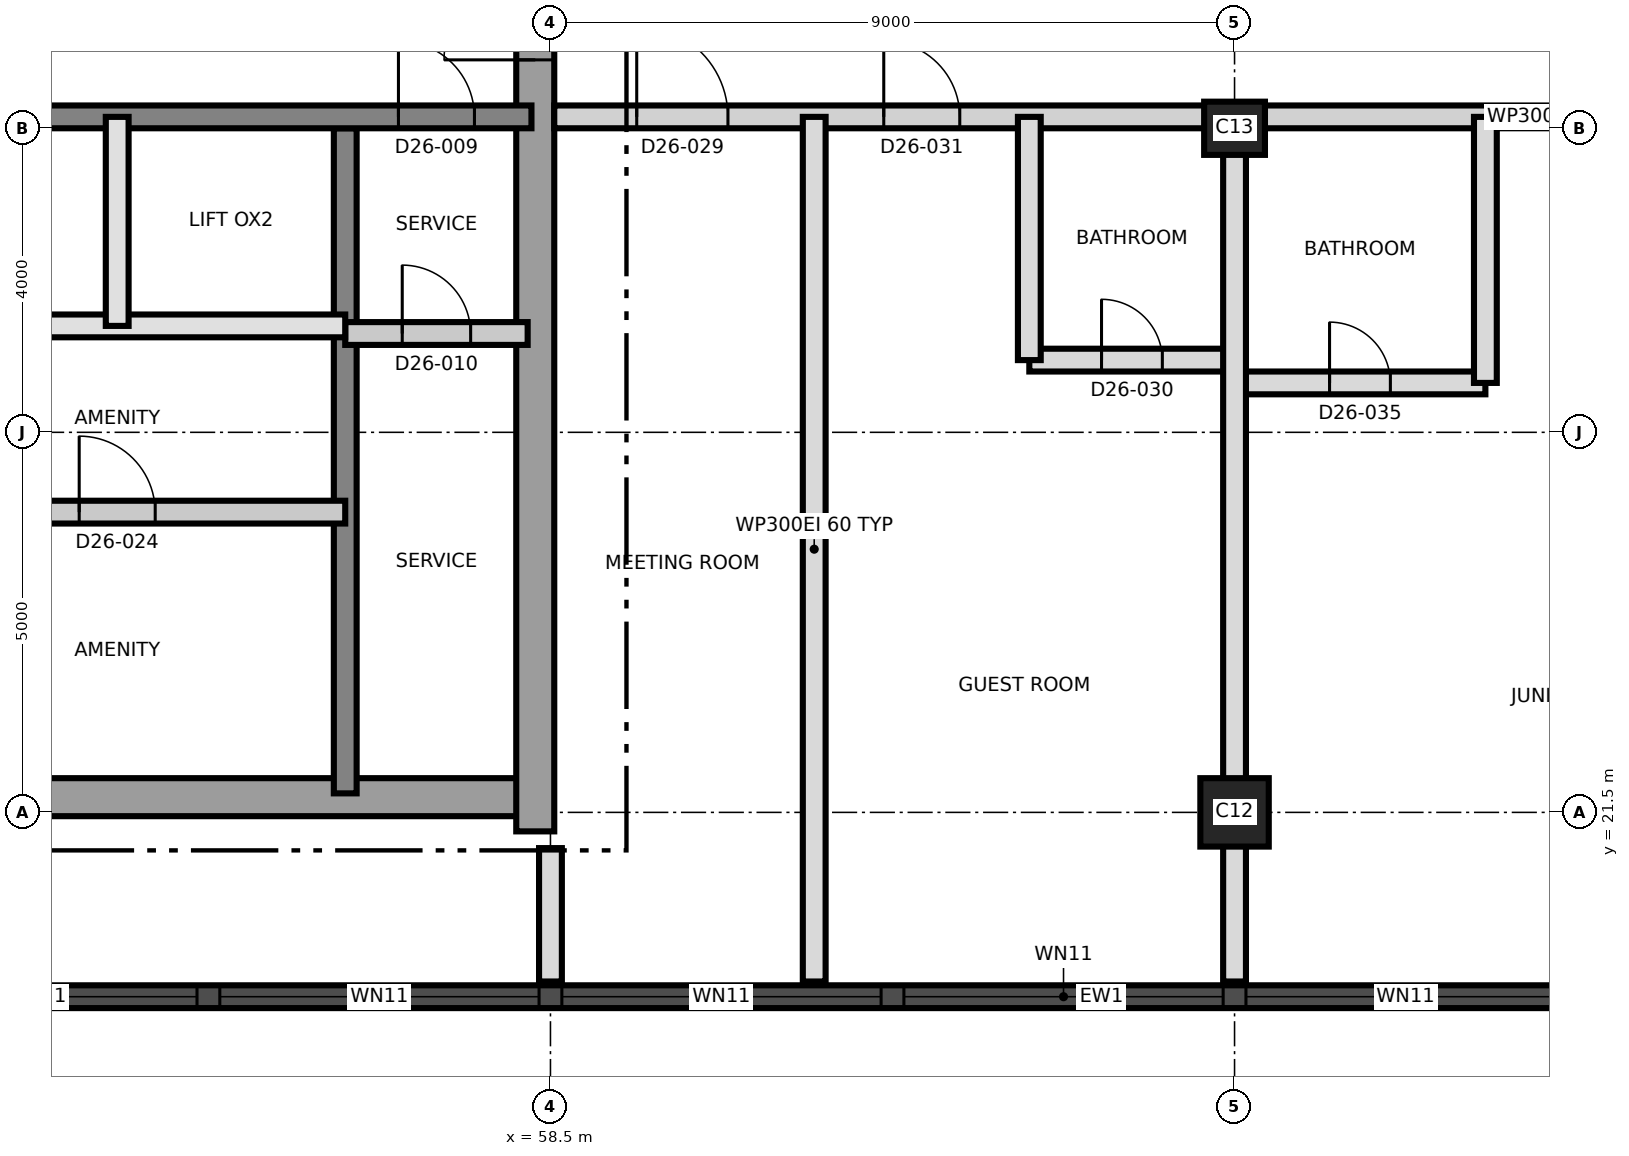
"""IFC4 building model, lengths in metres.
Left out: names, types, materials, properties, quantities, classifications, styles, units other than length and angle.
Written with IfcOpenShell. Run it as: python <this file> out.ifc"""

import sys

from ifc_helpers import new_model, si_unit, direction, frame, frame_2d, origin, origin_2d, place, context, subcontext, project, spatial, rectangle, extrude, element, fill, save


model = new_model("IFC4")
c1 = context("Model", 3, precision=1e-05, world=origin(), true_north=direction((0.0, 1.0)))
c2 = subcontext(c1, "Body", "Model", "MODEL_VIEW")
j1 = project(units=[si_unit("LENGTHUNIT", "METRE"), si_unit("PLANEANGLEUNIT", "RADIAN")], contexts=[c1])
p1 = place(None, origin())
s1 = spatial("IfcSite", under=j1, at=p1, CompositionType="ELEMENT")
p2 = place(p1, origin())
s2 = spatial("IfcBuilding", under=s1, at=p2, CompositionType="ELEMENT")
p3 = place(p2, frame((0.0, 0.0, 232.8)))
s3 = spatial("IfcBuildingStorey", under=s2, at=p3, CompositionType="ELEMENT", Elevation=232.8)
p4 = place(p3, frame((31.25, 21.7, 0.0), z_axis=(0.0, 0.0, 1.0), x_axis=(1.0, 0.0, 0.0)))
e1 = element("IfcWall", 1, at=p4, inside=s3, PredefinedType="SHEAR", context=c2, shape_type="SweptSolid", body=[
    extrude(rectangle(XDim=27.0, YDim=0.5, at=frame_2d((13.5, 0.0))), origin(), (0.0, 0.0, 1.0), 3.7),
])
p5 = place(p3, frame((58.3, 21.25, 0.0), z_axis=(0.0, 0.0, 1.0), x_axis=(0.0, 1.0, 0.0)))
e2 = element("IfcWall", 2, at=p5, inside=s3, PredefinedType="SHEAR", context=c2, shape_type="SweptSolid", body=[
    extrude(rectangle(XDim=18.5, YDim=0.5, at=frame_2d((9.25, 0.0))), origin(), (0.0, 0.0, 1.0), 3.7),
])
p6 = place(p5, frame((10.15, 0.0, 0.0)))
e3 = element("IfcOpeningElement", 3, at=p6, cuts=e2, PredefinedType="OPENING", context=c2, shape_type="SweptSolid", body=[
    extrude(rectangle(XDim=1.2, YDim=2.1, at=frame_2d((0.6, 1.05))), frame((0.0, 0.26, 0.0), z_axis=(0.0, -1.0, 0.0), x_axis=(1.0, 0.0, 0.0)), (0.0, 0.0, 1.0), 0.52),
])
p7 = place(p3, frame((55.8, 21.75, 0.0), z_axis=(0.0, 0.0, 1.0), x_axis=(0.0, 1.0, 0.0)))
e4 = element("IfcWall", 4, at=p7, inside=s3, PredefinedType="SHEAR", context=c2, shape_type="SweptSolid", body=[
    extrude(rectangle(XDim=8.75, YDim=0.3, at=frame_2d((4.375, 0.0))), origin(), (0.0, 0.0, 1.0), 3.7),
])
p8 = place(p3, frame((31.75, 30.65, 0.0), z_axis=(0.0, 0.0, 1.0), x_axis=(1.0, 0.0, 0.0)))
e5 = element("IfcWall", 5, at=p8, inside=s3, PredefinedType="SHEAR", context=c2, shape_type="SweptSolid", body=[
    extrude(rectangle(XDim=26.5, YDim=0.3, at=frame_2d((13.25, 0.0))), origin(), (0.0, 0.0, 1.0), 3.7),
])
p9 = place(p8, frame((24.75, 0.0, 0.0)))
e6 = element("IfcOpeningElement", 6, at=p9, cuts=e5, PredefinedType="OPENING", context=c2, shape_type="SweptSolid", body=[
    extrude(rectangle(XDim=1.0, YDim=2.1, at=frame_2d((0.5, 1.05))), frame((0.0, 0.16, 0.0), z_axis=(0.0, -1.0, 0.0), x_axis=(1.0, 0.0, 0.0)), (0.0, 0.0, 1.0), 0.32),
])
p10 = place(p3, frame((67.5, 21.5, 0.0), z_axis=(0.0, 0.0, 1.0), x_axis=(1.0, 0.0, 0.0)))
e7 = element("IfcColumn", 7, at=p10, inside=s3, PredefinedType="COLUMN", context=c2, shape_type="SweptSolid", body=[
    extrude(rectangle(XDim=0.9, YDim=0.9, at=origin_2d()), origin(), (0.0, 0.0, 1.0), 3.7),
])
p11 = place(p3, frame((67.5, 30.5, 0.0), z_axis=(0.0, 0.0, 1.0), x_axis=(1.0, 0.0, 0.0)))
e8 = element("IfcColumn", 8, at=p11, inside=s3, PredefinedType="COLUMN", context=c2, shape_type="SweptSolid", body=[
    extrude(rectangle(XDim=0.8, YDim=0.7, at=origin_2d()), origin(), (0.0, 0.0, 1.0), 3.7),
])
p12 = place(p3, frame((44.01, 19.075, 0.0), z_axis=(0.0, 0.0, 1.0), x_axis=(1.0, 0.0, 0.0)))
e9 = element("IfcWall", 9, at=p12, inside=s3, PredefinedType="SOLIDWALL", context=c2, shape_type="SweptSolid", body=[
    extrude(rectangle(XDim=43.478, YDim=0.3, at=frame_2d((21.739, 0.0))), origin(), (0.0, 0.0, 1.0), 3.4),
])
p13 = place(p12, frame((1.845, 0.0, 0.3)))
e10 = element("IfcOpeningElement", 10, at=p13, cuts=e9, PredefinedType="OPENING", context=c2, shape_type="SweptSolid", body=[
    extrude(rectangle(XDim=1.8, YDim=2.4, at=frame_2d((0.9, 1.2))), frame((0.0, 0.16, 0.0), z_axis=(0.0, -1.0, 0.0), x_axis=(1.0, 0.0, 0.0)), (0.0, 0.0, 1.0), 0.32),
])
p14 = place(p12, frame((5.64, 0.0, 0.9)))
e11 = element("IfcOpeningElement", 11, at=p14, cuts=e9, PredefinedType="OPENING", context=c2, shape_type="SweptSolid", body=[
    extrude(rectangle(XDim=4.2, YDim=1.5, at=frame_2d((2.1, 0.75))), frame((0.0, 0.16, 0.0), z_axis=(0.0, -1.0, 0.0), x_axis=(1.0, 0.0, 0.0)), (0.0, 0.0, 1.0), 0.32),
])
p15 = place(p12, frame((10.14, 0.0, 0.9)))
e12 = element("IfcOpeningElement", 12, at=p15, cuts=e9, PredefinedType="OPENING", context=c2, shape_type="SweptSolid", body=[
    extrude(rectangle(XDim=4.2, YDim=1.5, at=frame_2d((2.1, 0.75))), frame((0.0, 0.16, 0.0), z_axis=(0.0, -1.0, 0.0), x_axis=(1.0, 0.0, 0.0)), (0.0, 0.0, 1.0), 0.32),
])
p16 = place(p12, frame((14.64, 0.0, 0.9)))
e13 = element("IfcOpeningElement", 13, at=p16, cuts=e9, PredefinedType="OPENING", context=c2, shape_type="SweptSolid", body=[
    extrude(rectangle(XDim=4.2, YDim=1.5, at=frame_2d((2.1, 0.75))), frame((0.0, 0.16, 0.0), z_axis=(0.0, -1.0, 0.0), x_axis=(1.0, 0.0, 0.0)), (0.0, 0.0, 1.0), 0.32),
])
p17 = place(p12, frame((19.14, 0.0, 0.9)))
e14 = element("IfcOpeningElement", 14, at=p17, cuts=e9, PredefinedType="OPENING", context=c2, shape_type="SweptSolid", body=[
    extrude(rectangle(XDim=4.2, YDim=1.5, at=frame_2d((2.1, 0.75))), frame((0.0, 0.16, 0.0), z_axis=(0.0, -1.0, 0.0), x_axis=(1.0, 0.0, 0.0)), (0.0, 0.0, 1.0), 0.32),
])
p18 = place(p12, frame((23.64, 0.0, 0.9)))
e15 = element("IfcOpeningElement", 15, at=p18, cuts=e9, PredefinedType="OPENING", context=c2, shape_type="SweptSolid", body=[
    extrude(rectangle(XDim=4.2, YDim=1.5, at=frame_2d((2.1, 0.75))), frame((0.0, 0.16, 0.0), z_axis=(0.0, -1.0, 0.0), x_axis=(1.0, 0.0, 0.0)), (0.0, 0.0, 1.0), 0.32),
])
p19 = place(p12, frame((28.14, 0.0, 0.9)))
e16 = element("IfcOpeningElement", 16, at=p19, cuts=e9, PredefinedType="OPENING", context=c2, shape_type="SweptSolid", body=[
    extrude(rectangle(XDim=4.2, YDim=1.5, at=frame_2d((2.1, 0.75))), frame((0.0, 0.16, 0.0), z_axis=(0.0, -1.0, 0.0), x_axis=(1.0, 0.0, 0.0)), (0.0, 0.0, 1.0), 0.32),
])
p20 = place(p12, frame((32.64, 0.0, 0.9)))
e17 = element("IfcOpeningElement", 17, at=p20, cuts=e9, PredefinedType="OPENING", context=c2, shape_type="SweptSolid", body=[
    extrude(rectangle(XDim=4.2, YDim=1.5, at=frame_2d((2.1, 0.75))), frame((0.0, 0.16, 0.0), z_axis=(0.0, -1.0, 0.0), x_axis=(1.0, 0.0, 0.0)), (0.0, 0.0, 1.0), 0.32),
])
p21 = place(p12, frame((37.14, 0.0, 0.9)))
e18 = element("IfcOpeningElement", 18, at=p21, cuts=e9, PredefinedType="OPENING", context=c2, shape_type="SweptSolid", body=[
    extrude(rectangle(XDim=4.2, YDim=1.5, at=frame_2d((2.1, 0.75))), frame((0.0, 0.16, 0.0), z_axis=(0.0, -1.0, 0.0), x_axis=(1.0, 0.0, 0.0)), (0.0, 0.0, 1.0), 0.32),
])
p22 = place(p3, frame((49.8, 25.45, 0.0), z_axis=(0.0, 0.0, 1.0), x_axis=(1.0, 0.0, 0.0)))
e19 = element("IfcWall", 19, at=p22, inside=s3, PredefinedType="PARTITIONING", context=c2, shape_type="SweptSolid", body=[
    extrude(rectangle(XDim=6.0, YDim=0.3, at=frame_2d((3.0, 0.0))), origin(), (0.0, 0.0, 1.0), 3.4),
])
p23 = place(p22, frame((2.5, 0.0, 0.0)))
e20 = element("IfcOpeningElement", 20, at=p23, cuts=e19, PredefinedType="OPENING", context=c2, shape_type="SweptSolid", body=[
    extrude(rectangle(XDim=1.0, YDim=2.1, at=frame_2d((0.5, 1.05))), frame((0.0, 0.16, 0.0), z_axis=(0.0, -1.0, 0.0), x_axis=(1.0, 0.0, 0.0)), (0.0, 0.0, 1.0), 0.32),
])
p24 = place(p3, frame((55.8, 27.8, 0.0), z_axis=(0.0, 0.0, 1.0), x_axis=(1.0, 0.0, 0.0)))
e21 = element("IfcWall", 21, at=p24, inside=s3, PredefinedType="PARTITIONING", context=c2, shape_type="SweptSolid", body=[
    extrude(rectangle(XDim=2.4, YDim=0.3, at=frame_2d((1.2, 0.0))), origin(), (0.0, 0.0, 1.0), 3.4),
])
p25 = place(p24, frame((0.75, 0.0, 0.0)))
e22 = element("IfcOpeningElement", 22, at=p25, cuts=e21, PredefinedType="OPENING", context=c2, shape_type="SweptSolid", body=[
    extrude(rectangle(XDim=0.9, YDim=2.1, at=frame_2d((0.45, 1.05))), frame((0.0, 0.16, 0.0), z_axis=(0.0, -1.0, 0.0), x_axis=(1.0, 0.0, 0.0)), (0.0, 0.0, 1.0), 0.32),
])
p26 = place(p3, frame((49.8, 27.9, 0.0), z_axis=(0.0, 0.0, 1.0), x_axis=(1.0, 0.0, 0.0)))
e23 = element("IfcWall", 23, at=p26, inside=s3, PredefinedType="SOLIDWALL", context=c2, shape_type="SweptSolid", body=[
    extrude(rectangle(XDim=6.0, YDim=0.3, at=frame_2d((3.0, 0.0))), origin(), (0.0, 0.0, 1.0), 3.4),
])
p27 = place(p3, frame((52.8, 27.9, 0.0), z_axis=(0.0, 0.0, 1.0), x_axis=(0.0, 1.0, 0.0)))
e24 = element("IfcWall", 24, at=p27, inside=s3, PredefinedType="SOLIDWALL", context=c2, shape_type="SweptSolid", body=[
    extrude(rectangle(XDim=2.75, YDim=0.3, at=frame_2d((1.375, 0.0))), origin(), (0.0, 0.0, 1.0), 3.4),
])
p28 = place(p3, frame((67.5, 27.15, 0.0), z_axis=(0.0, 0.0, 1.0), x_axis=(1.0, 0.0, 0.0)))
e25 = element("IfcWall", 25, at=p28, inside=s3, PredefinedType="PARTITIONING", context=c2, shape_type="SweptSolid", body=[
    extrude(rectangle(XDim=3.3, YDim=0.3, at=frame_2d((1.65, 0.0))), origin(), (0.0, 0.0, 1.0), 3.4),
])
p29 = place(p28, frame((1.25, 0.0, 0.0)))
e26 = element("IfcOpeningElement", 26, at=p29, cuts=e25, PredefinedType="OPENING", context=c2, shape_type="SweptSolid", body=[
    extrude(rectangle(XDim=0.8, YDim=2.1, at=frame_2d((0.4, 1.05))), frame((0.0, 0.16, 0.0), z_axis=(0.0, -1.0, 0.0), x_axis=(1.0, 0.0, 0.0)), (0.0, 0.0, 1.0), 0.32),
])
p30 = place(p3, frame((64.8, 27.45, 0.0), z_axis=(0.0, 0.0, 1.0), x_axis=(1.0, 0.0, 0.0)))
e27 = element("IfcWall", 27, at=p30, inside=s3, PredefinedType="PARTITIONING", context=c2, shape_type="SweptSolid", body=[
    extrude(rectangle(XDim=2.7, YDim=0.3, at=frame_2d((1.35, 0.0))), origin(), (0.0, 0.0, 1.0), 3.4),
])
p31 = place(p30, frame((0.95, 0.0, 0.0)))
e28 = element("IfcOpeningElement", 28, at=p31, cuts=e27, PredefinedType="OPENING", context=c2, shape_type="SweptSolid", body=[
    extrude(rectangle(XDim=0.8, YDim=2.1, at=frame_2d((0.4, 1.05))), frame((0.0, 0.16, 0.0), z_axis=(0.0, -1.0, 0.0), x_axis=(1.0, 0.0, 0.0)), (0.0, 0.0, 1.0), 0.32),
])
p32 = place(p3, frame((58.55, 30.65, 0.0), z_axis=(0.0, 0.0, 1.0), x_axis=(1.0, 0.0, 0.0)))
e29 = element("IfcWall", 29, at=p32, inside=s3, PredefinedType="PARTITIONING", context=c2, shape_type="SweptSolid", body=[
    extrude(rectangle(XDim=26.78, YDim=0.3, at=frame_2d((13.39, 0.0))), origin(), (0.0, 0.0, 1.0), 3.4),
])
p33 = place(p32, frame((1.085, 0.0, 0.0)))
e30 = element("IfcOpeningElement", 30, at=p33, cuts=e29, PredefinedType="OPENING", context=c2, shape_type="SweptSolid", body=[
    extrude(rectangle(XDim=1.2, YDim=2.1, at=frame_2d((0.6, 1.05))), frame((0.0, 0.16, 0.0), z_axis=(0.0, -1.0, 0.0), x_axis=(1.0, 0.0, 0.0)), (0.0, 0.0, 1.0), 0.32),
])
p34 = place(p32, frame((4.335, 0.0, 0.0)))
e31 = element("IfcOpeningElement", 31, at=p34, cuts=e29, PredefinedType="OPENING", context=c2, shape_type="SweptSolid", body=[
    extrude(rectangle(XDim=1.0, YDim=2.1, at=frame_2d((0.5, 1.05))), frame((0.0, 0.16, 0.0), z_axis=(0.0, -1.0, 0.0), x_axis=(1.0, 0.0, 0.0)), (0.0, 0.0, 1.0), 0.32),
])
p35 = place(p32, frame((14.6, 0.0, 0.0)))
e32 = element("IfcOpeningElement", 32, at=p35, cuts=e29, PredefinedType="OPENING", context=c2, shape_type="SweptSolid", body=[
    extrude(rectangle(XDim=1.0, YDim=2.4, at=frame_2d((0.5, 1.2))), frame((0.0, 0.16, 0.0), z_axis=(0.0, -1.0, 0.0), x_axis=(1.0, 0.0, 0.0)), (0.0, 0.0, 1.0), 0.32),
])
p36 = place(p32, frame((20.3, 0.0, 0.0)))
e33 = element("IfcOpeningElement", 33, at=p36, cuts=e29, PredefinedType="OPENING", context=c2, shape_type="SweptSolid", body=[
    extrude(rectangle(XDim=1.0, YDim=2.4, at=frame_2d((0.5, 1.2))), frame((0.0, 0.16, 0.0), z_axis=(0.0, -1.0, 0.0), x_axis=(1.0, 0.0, 0.0)), (0.0, 0.0, 1.0), 0.32),
])
p37 = place(p3, frame((58.5, 19.275, 0.0), z_axis=(0.0, 0.0, 1.0), x_axis=(0.0, 1.0, 0.0)))
e34 = element("IfcWall", 34, at=p37, inside=s3, PredefinedType="PARTITIONING", context=c2, shape_type="SweptSolid", body=[
    extrude(rectangle(XDim=1.755, YDim=0.3, at=frame_2d((0.877, 0.0))), origin(), (0.0, 0.0, 1.0), 3.4),
])
p38 = place(p3, frame((61.97, 19.275, 0.0), z_axis=(0.0, 0.0, 1.0), x_axis=(0.0, 1.0, 0.0)))
e35 = element("IfcWall", 35, at=p38, inside=s3, PredefinedType="PARTITIONING", context=c2, shape_type="SweptSolid", body=[
    extrude(rectangle(XDim=11.375, YDim=0.3, at=frame_2d((5.688, 0.0))), origin(), (0.0, 0.0, 1.0), 3.4),
])
p39 = place(p3, frame((64.8, 27.45, 0.0), z_axis=(0.0, 0.0, 1.0), x_axis=(0.0, 1.0, 0.0)))
e36 = element("IfcWall", 36, at=p39, inside=s3, PredefinedType="PARTITIONING", context=c2, shape_type="SweptSolid", body=[
    extrude(rectangle(XDim=3.2, YDim=0.3, at=frame_2d((1.6, 0.0))), origin(), (0.0, 0.0, 1.0), 3.4),
])
p40 = place(p3, frame((67.5, 19.275, 0.0), z_axis=(0.0, 0.0, 1.0), x_axis=(0.0, 1.0, 0.0)))
e37 = element("IfcWall", 37, at=p40, inside=s3, PredefinedType="PARTITIONING", context=c2, shape_type="SweptSolid", body=[
    extrude(rectangle(XDim=11.375, YDim=0.3, at=frame_2d((5.688, 0.0))), origin(), (0.0, 0.0, 1.0), 3.4),
])
p41 = place(p3, frame((70.8, 27.15, 0.0), z_axis=(0.0, 0.0, 1.0), x_axis=(0.0, 1.0, 0.0)))
e38 = element("IfcWall", 38, at=p41, inside=s3, PredefinedType="PARTITIONING", context=c2, shape_type="SweptSolid", body=[
    extrude(rectangle(XDim=3.5, YDim=0.3, at=frame_2d((1.75, 0.0))), origin(), (0.0, 0.0, 1.0), 3.4),
])
p42 = place(p14, origin())
e39 = element("IfcWindow", 39, at=p42, inside=s3, PartitioningType="SINGLE_PANEL", PredefinedType="WINDOW", context=c2, shape_type="SweptSolid", body=[
    extrude(rectangle(XDim=4.2, YDim=1.5, at=frame_2d((2.1, 0.75))), frame((0.0, 0.03, 0.0), z_axis=(0.0, -1.0, 0.0), x_axis=(1.0, 0.0, 0.0)), (0.0, 0.0, 1.0), 0.06),
])
fill(e11, e39)
p43 = place(p15, origin())
e40 = element("IfcWindow", 40, at=p43, inside=s3, PartitioningType="SINGLE_PANEL", PredefinedType="WINDOW", context=c2, shape_type="SweptSolid", body=[
    extrude(rectangle(XDim=4.2, YDim=1.5, at=frame_2d((2.1, 0.75))), frame((0.0, 0.03, 0.0), z_axis=(0.0, -1.0, 0.0), x_axis=(1.0, 0.0, 0.0)), (0.0, 0.0, 1.0), 0.06),
])
fill(e12, e40)
p44 = place(p16, origin())
e41 = element("IfcWindow", 41, at=p44, inside=s3, PartitioningType="SINGLE_PANEL", PredefinedType="WINDOW", context=c2, shape_type="SweptSolid", body=[
    extrude(rectangle(XDim=4.2, YDim=1.5, at=frame_2d((2.1, 0.75))), frame((0.0, 0.03, 0.0), z_axis=(0.0, -1.0, 0.0), x_axis=(1.0, 0.0, 0.0)), (0.0, 0.0, 1.0), 0.06),
])
fill(e13, e41)
p45 = place(p17, origin())
e42 = element("IfcWindow", 42, at=p45, inside=s3, PartitioningType="SINGLE_PANEL", PredefinedType="WINDOW", context=c2, shape_type="SweptSolid", body=[
    extrude(rectangle(XDim=4.2, YDim=1.5, at=frame_2d((2.1, 0.75))), frame((0.0, 0.03, 0.0), z_axis=(0.0, -1.0, 0.0), x_axis=(1.0, 0.0, 0.0)), (0.0, 0.0, 1.0), 0.06),
])
fill(e14, e42)
p46 = place(p18, origin())
e43 = element("IfcWindow", 43, at=p46, inside=s3, PartitioningType="SINGLE_PANEL", PredefinedType="WINDOW", context=c2, shape_type="SweptSolid", body=[
    extrude(rectangle(XDim=4.2, YDim=1.5, at=frame_2d((2.1, 0.75))), frame((0.0, 0.03, 0.0), z_axis=(0.0, -1.0, 0.0), x_axis=(1.0, 0.0, 0.0)), (0.0, 0.0, 1.0), 0.06),
])
fill(e15, e43)
p47 = place(p9, origin())
e44 = element("IfcDoor", 44, at=p47, inside=s3, OperationType="SINGLE_SWING_LEFT", PredefinedType="DOOR", context=c2, shape_type="SweptSolid", body=[
    extrude(rectangle(XDim=1.0, YDim=2.1, at=frame_2d((0.5, 1.05))), frame((0.0, 0.025, 0.0), z_axis=(0.0, -1.0, 0.0), x_axis=(1.0, 0.0, 0.0)), (0.0, 0.0, 1.0), 0.05),
])
fill(e6, e44)
p48 = place(p25, origin())
e45 = element("IfcDoor", 45, at=p48, inside=s3, OperationType="SINGLE_SWING_RIGHT", PredefinedType="DOOR", context=c2, shape_type="SweptSolid", body=[
    extrude(rectangle(XDim=0.9, YDim=2.1, at=frame_2d((0.45, 1.05))), frame((0.0, 0.025, 0.0), z_axis=(0.0, -1.0, 0.0), x_axis=(1.0, 0.0, 0.0)), (0.0, 0.0, 1.0), 0.05),
])
fill(e22, e45)
p49 = place(p6, origin())
e46 = element("IfcDoor", 46, at=p49, inside=s3, OperationType="SINGLE_SWING_LEFT", PredefinedType="DOOR", context=c2, shape_type="SweptSolid", body=[
    extrude(rectangle(XDim=1.2, YDim=2.1, at=frame_2d((0.6, 1.05))), frame((0.0, 0.025, 0.0), z_axis=(0.0, -1.0, 0.0), x_axis=(1.0, 0.0, 0.0)), (0.0, 0.0, 1.0), 0.05),
])
fill(e3, e46)
p50 = place(p23, origin())
e47 = element("IfcDoor", 47, at=p50, inside=s3, OperationType="SINGLE_SWING_RIGHT", PredefinedType="DOOR", context=c2, shape_type="SweptSolid", body=[
    extrude(rectangle(XDim=1.0, YDim=2.1, at=frame_2d((0.5, 1.05))), frame((0.0, 0.025, 0.0), z_axis=(0.0, -1.0, 0.0), x_axis=(1.0, 0.0, 0.0)), (0.0, 0.0, 1.0), 0.05),
])
fill(e20, e47)
p51 = place(p33, origin())
e48 = element("IfcDoor", 48, at=p51, inside=s3, OperationType="SINGLE_SWING_LEFT", PredefinedType="DOOR", context=c2, shape_type="SweptSolid", body=[
    extrude(rectangle(XDim=1.2, YDim=2.1, at=frame_2d((0.6, 1.05))), frame((0.0, 0.025, 0.0), z_axis=(0.0, -1.0, 0.0), x_axis=(1.0, 0.0, 0.0)), (0.0, 0.0, 1.0), 0.05),
])
fill(e30, e48)
p52 = place(p31, origin())
e49 = element("IfcDoor", 49, at=p52, inside=s3, OperationType="SINGLE_SWING_RIGHT", PredefinedType="DOOR", context=c2, shape_type="SweptSolid", body=[
    extrude(rectangle(XDim=0.8, YDim=2.1, at=frame_2d((0.4, 1.05))), frame((0.0, 0.025, 0.0), z_axis=(0.0, -1.0, 0.0), x_axis=(1.0, 0.0, 0.0)), (0.0, 0.0, 1.0), 0.05),
])
fill(e28, e49)
p53 = place(p34, origin())
e50 = element("IfcDoor", 50, at=p53, inside=s3, OperationType="SINGLE_SWING_LEFT", PredefinedType="DOOR", context=c2, shape_type="SweptSolid", body=[
    extrude(rectangle(XDim=1.0, YDim=2.1, at=frame_2d((0.5, 1.05))), frame((0.0, 0.025, 0.0), z_axis=(0.0, -1.0, 0.0), x_axis=(1.0, 0.0, 0.0)), (0.0, 0.0, 1.0), 0.05),
])
fill(e31, e50)
p54 = place(p29, origin())
e51 = element("IfcDoor", 51, at=p54, inside=s3, OperationType="SINGLE_SWING_LEFT", PredefinedType="DOOR", context=c2, shape_type="SweptSolid", body=[
    extrude(rectangle(XDim=0.8, YDim=2.1, at=frame_2d((0.4, 1.05))), frame((0.0, 0.025, 0.0), z_axis=(0.0, -1.0, 0.0), x_axis=(1.0, 0.0, 0.0)), (0.0, 0.0, 1.0), 0.05),
])
fill(e26, e51)
save(model, sys.argv[1])
